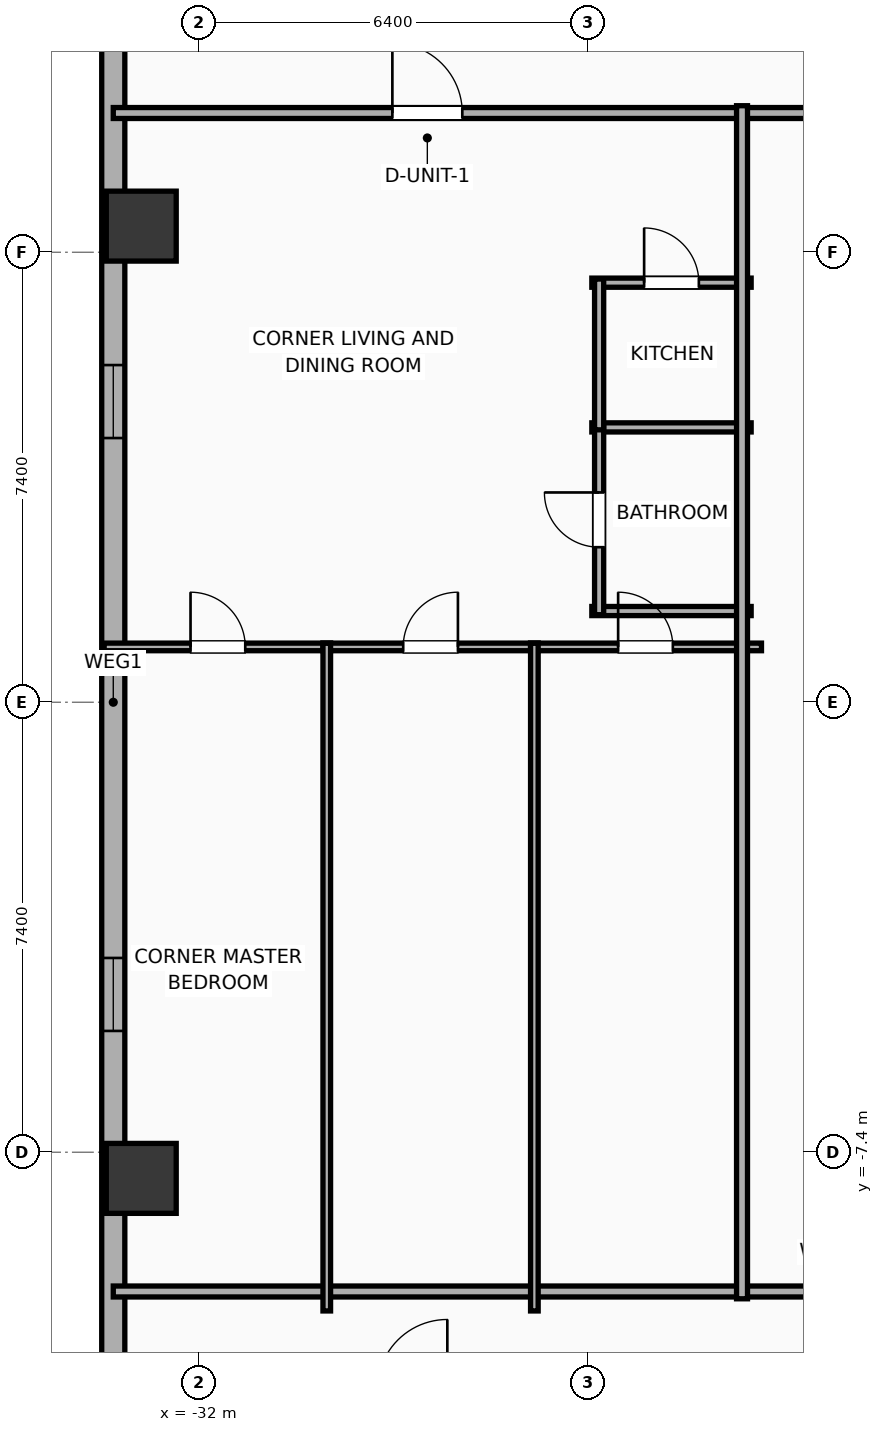
"""IFC4 building model, lengths in metres.
Left out: names, types, materials, properties, quantities, classifications, styles, units other than length and angle.
Written with IfcOpenShell. Run it as: python <this file> out.ifc"""

import sys

from ifc_helpers import new_model, si_unit, direction, frame, frame_2d, origin, origin_2d, place, context, subcontext, project, spatial, rectangle, hollow_rectangle, extrude, element, fill, save


model = new_model("IFC4")
c1 = context("Model", 3, precision=1e-05, world=origin(), true_north=direction((0.0, 1.0)))
c2 = subcontext(c1, "Body", "Model", "MODEL_VIEW")
j1 = project(units=[si_unit("LENGTHUNIT", "METRE"), si_unit("PLANEANGLEUNIT", "RADIAN")], contexts=[c1])
p1 = place(None, origin())
s1 = spatial("IfcSite", under=j1, at=p1, CompositionType="ELEMENT")
p2 = place(p1, origin())
s2 = spatial("IfcBuilding", under=s1, at=p2, CompositionType="ELEMENT")
p3 = place(p2, frame((0.0, 0.0, 49.4)))
s3 = spatial("IfcBuildingStorey", under=s2, at=p3, CompositionType="ELEMENT", Elevation=49.4)
for number, where, z_axis, x_axis in (
    (1, (-32.95, 7.83, 0.0), (0.0, 0.0, 1.0), (1.0, 0.0, 0.0)),
    (2, (-32.95, -7.83, 0.0), (0.0, 0.0, 1.0), (1.0, 0.0, 0.0)),
):
    element("IfcColumn", number, at=place(p3, frame(where, z_axis=z_axis, x_axis=x_axis)), inside=s3, PredefinedType="COLUMN", context=c2, shape_type="SweptSolid", body=[
        extrude(hollow_rectangle(XDim=1.15, YDim=1.15, WallThickness=0.04, at=origin_2d()), origin(), (0.0, 0.0, 1.0), 3.9),
    ])
p4 = place(p3, frame((-33.41, -18.381, 0.0), z_axis=(0.0, 0.0, 1.0), x_axis=(0.0, 1.0, 0.0)))
e3 = element("IfcWall", 3, at=p4, inside=s3, PredefinedType="ELEMENTEDWALL", context=c2, shape_type="SweptSolid", body=[
    extrude(rectangle(XDim=36.763, YDim=0.38, at=frame_2d((18.381, 0.0))), origin(), (0.0, 0.0, 1.0), 3.65),
])
p5 = place(p4, frame((33.787, 0.0, 0.75)))
e4 = element("IfcOpeningElement", 4, at=p5, cuts=e3, PredefinedType="OPENING", context=c2, shape_type="SweptSolid", body=[
    extrude(rectangle(XDim=1.2, YDim=2.05, at=frame_2d((0.6, 1.025))), frame((0.0, 0.2, 0.0), z_axis=(0.0, -1.0, 0.0), x_axis=(1.0, 0.0, 0.0)), (0.0, 0.0, 1.0), 0.4),
])
p6 = place(p4, frame((22.726, 0.0, 0.75)))
e5 = element("IfcOpeningElement", 5, at=p6, cuts=e3, PredefinedType="OPENING", context=c2, shape_type="SweptSolid", body=[
    extrude(rectangle(XDim=1.2, YDim=2.05, at=frame_2d((0.6, 1.025))), frame((0.0, 0.2, 0.0), z_axis=(0.0, -1.0, 0.0), x_axis=(1.0, 0.0, 0.0)), (0.0, 0.0, 1.0), 0.4),
])
p7 = place(p4, frame((12.976, 0.0, 0.75)))
e6 = element("IfcOpeningElement", 6, at=p7, cuts=e3, PredefinedType="OPENING", context=c2, shape_type="SweptSolid", body=[
    extrude(rectangle(XDim=1.2, YDim=2.05, at=frame_2d((0.6, 1.025))), frame((0.0, 0.2, 0.0), z_axis=(0.0, -1.0, 0.0), x_axis=(1.0, 0.0, 0.0)), (0.0, 0.0, 1.0), 0.4),
])
p8 = place(p3, frame((-33.41, 9.69, 0.0), z_axis=(0.0, 0.0, 1.0), x_axis=(1.0, 0.0, 0.0)))
e7 = element("IfcWall", 7, at=p8, inside=s3, PredefinedType="PARTITIONING", context=c2, shape_type="SweptSolid", body=[
    extrude(rectangle(XDim=23.53, YDim=0.18, at=frame_2d((11.765, 0.0))), origin(), (0.0, 0.0, 1.0), 3.65),
])
p9 = place(p8, frame((4.59, 0.0, 0.0)))
e8 = element("IfcOpeningElement", 8, at=p9, cuts=e7, PredefinedType="OPENING", context=c2, shape_type="SweptSolid", body=[
    extrude(rectangle(XDim=1.15, YDim=2.05, at=frame_2d((0.575, 1.025))), frame((0.0, 0.1, 0.0), z_axis=(0.0, -1.0, 0.0), x_axis=(1.0, 0.0, 0.0)), (0.0, 0.0, 1.0), 0.2),
])
p10 = place(p3, frame((-33.41, -9.69, 0.0), z_axis=(0.0, 0.0, 1.0), x_axis=(1.0, 0.0, 0.0)))
e9 = element("IfcWall", 9, at=p10, inside=s3, PredefinedType="PARTITIONING", context=c2, shape_type="SweptSolid", body=[
    extrude(rectangle(XDim=23.53, YDim=0.18, at=frame_2d((11.765, 0.0))), origin(), (0.0, 0.0, 1.0), 3.65),
])
p11 = place(p3, frame((-25.54, 6.9, 0.0), z_axis=(0.0, 0.0, 1.0), x_axis=(1.0, 0.0, 0.0)))
e10 = element("IfcWall", 10, at=p11, inside=s3, PredefinedType="PLUMBINGWALL", context=c2, shape_type="SweptSolid", body=[
    extrude(rectangle(XDim=2.62, YDim=0.15, at=frame_2d((1.31, 0.0))), origin(), (0.0, 0.0, 1.0), 3.65),
])
p12 = place(p11, frame((0.86, 0.0, 0.0)))
e11 = element("IfcOpeningElement", 11, at=p12, cuts=e10, PredefinedType="OPENING", context=c2, shape_type="SweptSolid", body=[
    extrude(rectangle(XDim=0.9, YDim=2.05, at=frame_2d((0.45, 1.025))), frame((0.0, 0.085, 0.0), z_axis=(0.0, -1.0, 0.0), x_axis=(1.0, 0.0, 0.0)), (0.0, 0.0, 1.0), 0.17),
])
for number, where, z_axis, x_axis in (
    (12, (-25.54, 4.52, 0.0), (0.0, 0.0, 1.0), (1.0, 0.0, 0.0)),
    (13, (-25.54, 1.5, 0.0), (0.0, 0.0, 1.0), (1.0, 0.0, 0.0)),
):
    element("IfcWall", number, at=place(p3, frame(where, z_axis=z_axis, x_axis=x_axis)), inside=s3, PredefinedType="PLUMBINGWALL", context=c2, shape_type="SweptSolid", body=[
        extrude(rectangle(XDim=2.62, YDim=0.15, at=frame_2d((1.31, 0.0))), origin(), (0.0, 0.0, 1.0), 3.65),
    ])
p13 = place(p3, frame((-25.42, 1.44, 0.0), z_axis=(0.0, 0.0, 1.0), x_axis=(0.0, 1.0, 0.0)))
e14 = element("IfcWall", 14, at=p13, inside=s3, PredefinedType="PLUMBINGWALL", context=c2, shape_type="SweptSolid", body=[
    extrude(rectangle(XDim=3.12, YDim=0.15, at=frame_2d((1.56, 0.0))), origin(), (0.0, 0.0, 1.0), 3.65),
])
p14 = place(p13, frame((1.11, 0.0, 0.0)))
e15 = element("IfcOpeningElement", 15, at=p14, cuts=e14, PredefinedType="OPENING", context=c2, shape_type="SweptSolid", body=[
    extrude(rectangle(XDim=0.9, YDim=2.05, at=frame_2d((0.45, 1.025))), frame((0.0, 0.085, 0.0), z_axis=(0.0, -1.0, 0.0), x_axis=(1.0, 0.0, 0.0)), (0.0, 0.0, 1.0), 0.17),
])
p15 = place(p3, frame((-25.42, 4.48, 0.0), z_axis=(0.0, 0.0, 1.0), x_axis=(0.0, 1.0, 0.0)))
e16 = element("IfcWall", 16, at=p15, inside=s3, PredefinedType="PLUMBINGWALL", context=c2, shape_type="SweptSolid", body=[
    extrude(rectangle(XDim=2.48, YDim=0.15, at=frame_2d((1.24, 0.0))), origin(), (0.0, 0.0, 1.0), 3.65),
])
p16 = place(p3, frame((-33.56, 0.91, 0.0), z_axis=(0.0, 0.0, 1.0), x_axis=(1.0, 0.0, 0.0)))
e17 = element("IfcWall", 17, at=p16, inside=s3, PredefinedType="PARTITIONING", context=c2, shape_type="SweptSolid", body=[
    extrude(rectangle(XDim=3.724, YDim=0.125, at=frame_2d((1.862, 0.0))), origin(), (0.0, 0.0, 1.0), 3.65),
])
p17 = place(p16, frame((1.42, 0.0, 0.0)))
e18 = element("IfcOpeningElement", 18, at=p17, cuts=e17, PredefinedType="OPENING", context=c2, shape_type="SweptSolid", body=[
    extrude(rectangle(XDim=0.9, YDim=2.05, at=frame_2d((0.45, 1.025))), frame((0.0, 0.073, 0.0), z_axis=(0.0, -1.0, 0.0), x_axis=(1.0, 0.0, 0.0)), (0.0, 0.0, 1.0), 0.145),
])
p18 = place(p3, frame((-29.961, 0.91, 0.0), z_axis=(0.0, 0.0, 1.0), x_axis=(1.0, 0.0, 0.0)))
e19 = element("IfcWall", 19, at=p18, inside=s3, PredefinedType="PARTITIONING", context=c2, shape_type="SweptSolid", body=[
    extrude(rectangle(XDim=3.539, YDim=0.125, at=frame_2d((1.77, 0.0))), origin(), (0.0, 0.0, 1.0), 3.65),
])
p19 = place(p18, frame((1.32, 0.0, 0.0)))
e20 = element("IfcOpeningElement", 20, at=p19, cuts=e19, PredefinedType="OPENING", context=c2, shape_type="SweptSolid", body=[
    extrude(rectangle(XDim=0.9, YDim=2.05, at=frame_2d((0.45, 1.025))), frame((0.0, 0.073, 0.0), z_axis=(0.0, -1.0, 0.0), x_axis=(1.0, 0.0, 0.0)), (0.0, 0.0, 1.0), 0.145),
])
p20 = place(p3, frame((-26.548, 0.91, 0.0), z_axis=(0.0, 0.0, 1.0), x_axis=(1.0, 0.0, 0.0)))
e21 = element("IfcWall", 21, at=p20, inside=s3, PredefinedType="PARTITIONING", context=c2, shape_type="SweptSolid", body=[
    extrude(rectangle(XDim=3.798, YDim=0.125, at=frame_2d((1.899, 0.0))), origin(), (0.0, 0.0, 1.0), 3.65),
])
p21 = place(p20, frame((1.44, 0.0, 0.0)))
e22 = element("IfcOpeningElement", 22, at=p21, cuts=e21, PredefinedType="OPENING", context=c2, shape_type="SweptSolid", body=[
    extrude(rectangle(XDim=0.9, YDim=2.05, at=frame_2d((0.45, 1.025))), frame((0.0, 0.073, 0.0), z_axis=(0.0, -1.0, 0.0), x_axis=(1.0, 0.0, 0.0)), (0.0, 0.0, 1.0), 0.145),
])
for number, where, z_axis, x_axis in (
    (23, (-26.485, -10.01, 0.0), (0.0, 0.0, 1.0), (0.0, 1.0, 0.0)),
    (24, (-29.899, -10.01, 0.0), (0.0, 0.0, 1.0), (0.0, 1.0, 0.0)),
):
    element("IfcWall", number, at=place(p3, frame(where, z_axis=z_axis, x_axis=x_axis)), inside=s3, PredefinedType="PARTITIONING", context=c2, shape_type="SweptSolid", body=[
        extrude(rectangle(XDim=10.98, YDim=0.125, at=frame_2d((5.49, 0.0))), origin(), (0.0, 0.0, 1.0), 3.65),
    ])
p22 = place(p3, frame((-23.07, -9.81, 0.0), z_axis=(0.0, 0.0, 1.0), x_axis=(0.0, 1.0, 0.0)))
e25 = element("IfcWall", 25, at=p22, inside=s3, PredefinedType="PARTITIONING", context=c2, shape_type="SweptSolid", body=[
    extrude(rectangle(XDim=19.62, YDim=0.18, at=frame_2d((9.81, 0.0))), origin(), (0.0, 0.0, 1.0), 3.65),
])
p23 = place(p6, origin())
e26 = element("IfcWindow", 26, at=p23, inside=s3, PartitioningType="SINGLE_PANEL", PredefinedType="WINDOW", context=c2, shape_type="SweptSolid", body=[
    extrude(rectangle(XDim=1.2, YDim=2.05, at=frame_2d((0.6, 1.025))), frame((0.0, 0.03, 0.0), z_axis=(0.0, -1.0, 0.0), x_axis=(1.0, 0.0, 0.0)), (0.0, 0.0, 1.0), 0.06),
])
fill(e5, e26)
p24 = place(p7, origin())
e27 = element("IfcWindow", 27, at=p24, inside=s3, PartitioningType="SINGLE_PANEL", PredefinedType="WINDOW", context=c2, shape_type="SweptSolid", body=[
    extrude(rectangle(XDim=1.2, YDim=2.05, at=frame_2d((0.6, 1.025))), frame((0.0, 0.03, 0.0), z_axis=(0.0, -1.0, 0.0), x_axis=(1.0, 0.0, 0.0)), (0.0, 0.0, 1.0), 0.06),
])
fill(e6, e27)
p25 = place(p9, origin())
e28 = element("IfcDoor", 28, at=p25, inside=s3, OperationType="SINGLE_SWING_LEFT", PredefinedType="DOOR", context=c2, shape_type="SweptSolid", body=[
    extrude(rectangle(XDim=1.15, YDim=2.05, at=frame_2d((0.575, 1.025))), frame((0.0, 0.025, 0.0), z_axis=(0.0, -1.0, 0.0), x_axis=(1.0, 0.0, 0.0)), (0.0, 0.0, 1.0), 0.05),
])
fill(e8, e28)
p26 = place(p12, origin())
e29 = element("IfcDoor", 29, at=p26, inside=s3, OperationType="SINGLE_SWING_LEFT", PredefinedType="DOOR", context=c2, shape_type="SweptSolid", body=[
    extrude(rectangle(XDim=0.9, YDim=2.05, at=frame_2d((0.45, 1.025))), frame((0.0, 0.025, 0.0), z_axis=(0.0, -1.0, 0.0), x_axis=(1.0, 0.0, 0.0)), (0.0, 0.0, 1.0), 0.05),
])
fill(e11, e29)
p27 = place(p14, origin())
e30 = element("IfcDoor", 30, at=p27, inside=s3, OperationType="SINGLE_SWING_RIGHT", PredefinedType="DOOR", context=c2, shape_type="SweptSolid", body=[
    extrude(rectangle(XDim=0.9, YDim=2.05, at=frame_2d((0.45, 1.025))), frame((0.0, 0.025, 0.0), z_axis=(0.0, -1.0, 0.0), x_axis=(1.0, 0.0, 0.0)), (0.0, 0.0, 1.0), 0.05),
])
fill(e15, e30)
p28 = place(p17, origin())
e31 = element("IfcDoor", 31, at=p28, inside=s3, OperationType="SINGLE_SWING_LEFT", PredefinedType="DOOR", context=c2, shape_type="SweptSolid", body=[
    extrude(rectangle(XDim=0.9, YDim=2.05, at=frame_2d((0.45, 1.025))), frame((0.0, 0.025, 0.0), z_axis=(0.0, -1.0, 0.0), x_axis=(1.0, 0.0, 0.0)), (0.0, 0.0, 1.0), 0.05),
])
fill(e18, e31)
p29 = place(p19, origin())
e32 = element("IfcDoor", 32, at=p29, inside=s3, OperationType="SINGLE_SWING_RIGHT", PredefinedType="DOOR", context=c2, shape_type="SweptSolid", body=[
    extrude(rectangle(XDim=0.9, YDim=2.05, at=frame_2d((0.45, 1.025))), frame((0.0, 0.025, 0.0), z_axis=(0.0, -1.0, 0.0), x_axis=(1.0, 0.0, 0.0)), (0.0, 0.0, 1.0), 0.05),
])
fill(e20, e32)
p30 = place(p21, origin())
e33 = element("IfcDoor", 33, at=p30, inside=s3, OperationType="SINGLE_SWING_LEFT", PredefinedType="DOOR", context=c2, shape_type="SweptSolid", body=[
    extrude(rectangle(XDim=0.9, YDim=2.05, at=frame_2d((0.45, 1.025))), frame((0.0, 0.025, 0.0), z_axis=(0.0, -1.0, 0.0), x_axis=(1.0, 0.0, 0.0)), (0.0, 0.0, 1.0), 0.05),
])
fill(e22, e33)
save(model, sys.argv[1])
